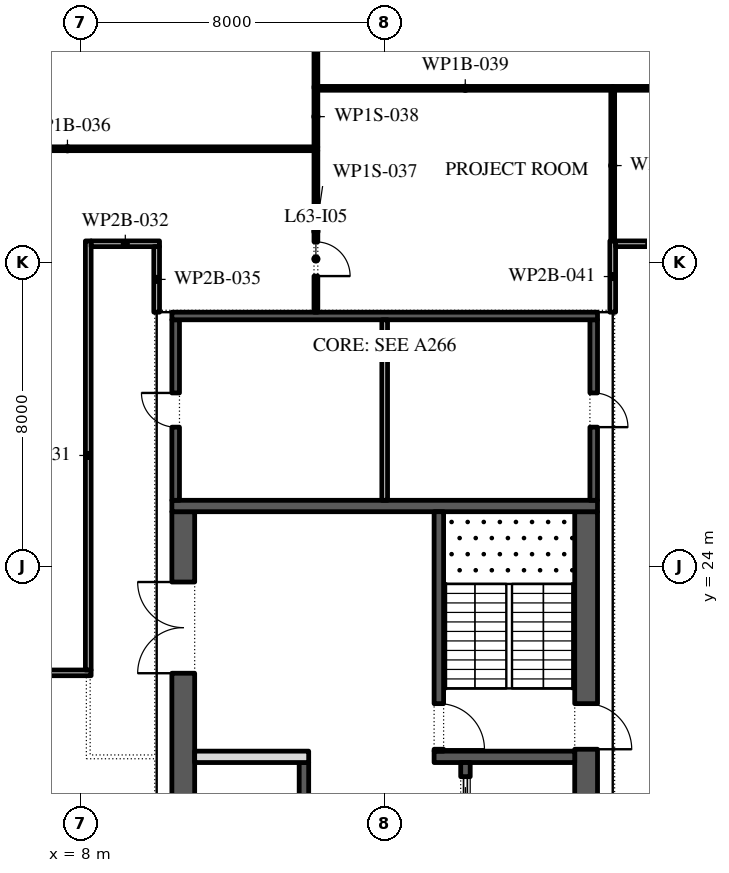
"""IFC4 building model, lengths in metres.
Left out: names, types, materials, properties, quantities, classifications, styles, units other than length and angle.
Written with IfcOpenShell. Run it as: python <this file> out.ifc"""

import sys

from ifc_helpers import new_model, si_unit, direction, frame, frame_2d, origin, place, context, subcontext, project, spatial, rectangle, extrude, element, fill, save


model = new_model("IFC4")
c1 = context("Model", 3, precision=1e-05, world=origin(), true_north=direction((0.0, 1.0)))
c2 = subcontext(c1, "Body", "Model", "MODEL_VIEW")
j1 = project(units=[si_unit("LENGTHUNIT", "METRE"), si_unit("PLANEANGLEUNIT", "RADIAN")], contexts=[c1])
p1 = place(None, origin())
s1 = spatial("IfcSite", under=j1, at=p1, CompositionType="ELEMENT")
p2 = place(p1, origin())
s2 = spatial("IfcBuilding", under=s1, at=p2, CompositionType="ELEMENT")
p3 = place(p2, frame((0.0, 0.0, 289.2)))
s3 = spatial("IfcBuildingStorey", under=s2, at=p3, CompositionType="ELEMENT", Elevation=289.2)
p4 = place(p3, frame((21.359, -11.678, 0.0), z_axis=(0.0, 0.0, 1.0), x_axis=(0.224949198343, 0.974370493275, 0.0)))
e1 = element("IfcWall", 1, at=p4, inside=s3, PredefinedType="STANDARD", context=c2, shape_type="SweptSolid", body=[
    extrude(rectangle(XDim=49.5, YDim=0.3, at=frame_2d((24.75, 0.0))), origin(), (0.0, 0.0, 1.0), 3.95),
])
p5 = place(p4, frame((1.157, 0.0, 0.45)))
e2 = element("IfcOpeningElement", 2, at=p5, cuts=e1, PredefinedType="OPENING", context=c2, shape_type="SweptSolid", body=[
    extrude(rectangle(XDim=4.5, YDim=3.05, at=frame_2d((2.25, 1.525))), frame((0.0, 0.16, 0.0), z_axis=(0.0, -1.0, 0.0), x_axis=(1.0, 0.0, 0.0)), (0.0, 0.0, 1.0), 0.32),
])
p6 = place(p4, frame((8.121, 0.0, 0.45)))
e3 = element("IfcOpeningElement", 3, at=p6, cuts=e1, PredefinedType="OPENING", context=c2, shape_type="SweptSolid", body=[
    extrude(rectangle(XDim=4.5, YDim=3.05, at=frame_2d((2.25, 1.525))), frame((0.0, 0.16, 0.0), z_axis=(0.0, -1.0, 0.0), x_axis=(1.0, 0.0, 0.0)), (0.0, 0.0, 1.0), 0.32),
])
p7 = place(p4, frame((15.236, 0.0, 0.45)))
e4 = element("IfcOpeningElement", 4, at=p7, cuts=e1, PredefinedType="OPENING", context=c2, shape_type="SweptSolid", body=[
    extrude(rectangle(XDim=4.5, YDim=3.05, at=frame_2d((2.25, 1.525))), frame((0.0, 0.16, 0.0), z_axis=(0.0, -1.0, 0.0), x_axis=(1.0, 0.0, 0.0)), (0.0, 0.0, 1.0), 0.32),
])
p8 = place(p4, frame((22.35, 0.0, 0.45)))
e5 = element("IfcOpeningElement", 5, at=p8, cuts=e1, PredefinedType="OPENING", context=c2, shape_type="SweptSolid", body=[
    extrude(rectangle(XDim=4.5, YDim=3.0, at=frame_2d((2.25, 1.5))), frame((0.0, 0.16, 0.0), z_axis=(0.0, -1.0, 0.0), x_axis=(1.0, 0.0, 0.0)), (0.0, 0.0, 1.0), 0.32),
])
p9 = place(p4, frame((29.464, 0.0, 0.45)))
e6 = element("IfcOpeningElement", 6, at=p9, cuts=e1, PredefinedType="OPENING", context=c2, shape_type="SweptSolid", body=[
    extrude(rectangle(XDim=4.5, YDim=2.9, at=frame_2d((2.25, 1.45))), frame((0.0, 0.16, 0.0), z_axis=(0.0, -1.0, 0.0), x_axis=(1.0, 0.0, 0.0)), (0.0, 0.0, 1.0), 0.32),
])
p10 = place(p4, frame((37.628, 0.0, 0.0)))
e7 = element("IfcOpeningElement", 7, at=p10, cuts=e1, PredefinedType="OPENING", context=c2, shape_type="SweptSolid", body=[
    extrude(rectangle(XDim=2.4, YDim=3.275, at=frame_2d((1.2, 1.637))), frame((0.0, 0.16, 0.0), z_axis=(0.0, -1.0, 0.0), x_axis=(1.0, 0.0, 0.0)), (0.0, 0.0, 1.0), 0.32),
])
p11 = place(p4, frame((43.693, 0.0, 0.45)))
e8 = element("IfcOpeningElement", 8, at=p11, cuts=e1, PredefinedType="OPENING", context=c2, shape_type="SweptSolid", body=[
    extrude(rectangle(XDim=4.5, YDim=3.05, at=frame_2d((2.25, 1.525))), frame((0.0, 0.16, 0.0), z_axis=(0.0, -1.0, 0.0), x_axis=(1.0, 0.0, 0.0)), (0.0, 0.0, 1.0), 0.32),
])
p12 = place(p3, frame((21.3, -2.45, 0.0), z_axis=(0.0, 0.0, 1.0), x_axis=(0.0, 1.0, 0.0)))
e9 = element("IfcWall", 9, at=p12, inside=s3, PredefinedType="SHEAR", context=c2, shape_type="SweptSolid", body=[
    extrude(rectangle(XDim=27.9, YDim=0.6, at=frame_2d((13.95, 0.0))), origin(), (0.0, 0.0, 1.0), 3.95),
])
p13 = place(p12, frame((5.05, 0.0, 0.0)))
e10 = element("IfcOpeningElement", 10, at=p13, cuts=e9, PredefinedType="OPENING", context=c2, shape_type="SweptSolid", body=[
    extrude(rectangle(XDim=1.2, YDim=2.1, at=frame_2d((0.6, 1.05))), frame((0.0, 0.31, 0.0), z_axis=(0.0, -1.0, 0.0), x_axis=(1.0, 0.0, 0.0)), (0.0, 0.0, 1.0), 0.62),
])
p14 = place(p12, frame((21.65, 0.0, 0.0)))
e11 = element("IfcOpeningElement", 11, at=p14, cuts=e9, PredefinedType="OPENING", context=c2, shape_type="SweptSolid", body=[
    extrude(rectangle(XDim=1.2, YDim=2.1, at=frame_2d((0.6, 1.05))), frame((0.0, 0.31, 0.0), z_axis=(0.0, -1.0, 0.0), x_axis=(1.0, 0.0, 0.0)), (0.0, 0.0, 1.0), 0.62),
])
p15 = place(p3, frame((10.7, -2.45, 0.0), z_axis=(0.0, 0.0, 1.0), x_axis=(0.0, 1.0, 0.0)))
e12 = element("IfcWall", 12, at=p15, inside=s3, PredefinedType="SHEAR", context=c2, shape_type="SweptSolid", body=[
    extrude(rectangle(XDim=27.9, YDim=0.6, at=frame_2d((13.95, 0.0))), origin(), (0.0, 0.0, 1.0), 3.95),
])
p16 = place(p15, frame((23.65, 0.0, 0.0)))
e13 = element("IfcOpeningElement", 13, at=p16, cuts=e12, PredefinedType="OPENING", context=c2, shape_type="SweptSolid", body=[
    extrude(rectangle(XDim=2.4, YDim=2.1, at=frame_2d((1.2, 1.05))), frame((0.0, 0.31, 0.0), z_axis=(0.0, -1.0, 0.0), x_axis=(1.0, 0.0, 0.0)), (0.0, 0.0, 1.0), 0.62),
])
p17 = place(p15, frame((1.387, 0.0, 0.0)))
e14 = element("IfcOpeningElement", 14, at=p17, cuts=e12, PredefinedType="OPENING", context=c2, shape_type="SweptSolid", body=[
    extrude(rectangle(XDim=0.9, YDim=2.1, at=frame_2d((0.45, 1.05))), frame((0.0, 0.31, 0.0), z_axis=(0.0, -1.0, 0.0), x_axis=(1.0, 0.0, 0.0)), (0.0, 0.0, 1.0), 0.62),
])
p18 = place(p15, frame((4.562, 0.0, 0.0)))
e15 = element("IfcOpeningElement", 15, at=p18, cuts=e12, PredefinedType="OPENING", context=c2, shape_type="SweptSolid", body=[
    extrude(rectangle(XDim=1.0, YDim=2.1, at=frame_2d((0.5, 1.05))), frame((0.0, 0.31, 0.0), z_axis=(0.0, -1.0, 0.0), x_axis=(1.0, 0.0, 0.0)), (0.0, 0.0, 1.0), 0.62),
])
p19 = place(p3, frame((10.4, 25.6, 0.0), z_axis=(0.0, 0.0, 1.0), x_axis=(1.0, 0.0, 0.0)))
e16 = element("IfcWall", 16, at=p19, inside=s3, PredefinedType="SHEAR", context=c2, shape_type="SweptSolid", body=[
    extrude(rectangle(XDim=11.2, YDim=0.3, at=frame_2d((5.6, 0.0))), origin(), (0.0, 0.0, 1.0), 3.95),
])
p20 = place(p3, frame((17.3, 19.0, 0.0), z_axis=(0.0, 0.0, 1.0), x_axis=(1.0, 0.0, 0.0)))
e17 = element("IfcWall", 17, at=p20, inside=s3, PredefinedType="SHEAR", context=c2, shape_type="SweptSolid", body=[
    extrude(rectangle(XDim=3.7, YDim=0.3, at=frame_2d((1.85, 0.0))), origin(), (0.0, 0.0, 1.0), 3.95),
])
p21 = place(p3, frame((17.425, 19.15, 0.0), z_axis=(0.0, 0.0, 1.0), x_axis=(0.0, 1.0, 0.0)))
e18 = element("IfcWall", 18, at=p21, inside=s3, PredefinedType="SHEAR", context=c2, shape_type="SweptSolid", body=[
    extrude(rectangle(XDim=6.3, YDim=0.25, at=frame_2d((3.15, 0.0))), origin(), (0.0, 0.0, 1.0), 3.95),
])
p22 = place(p21, frame((0.05, 0.0, 0.0)))
e19 = element("IfcOpeningElement", 19, at=p22, cuts=e18, PredefinedType="OPENING", context=c2, shape_type="SweptSolid", body=[
    extrude(rectangle(XDim=1.2, YDim=2.1, at=frame_2d((0.6, 1.05))), frame((0.0, 0.135, 0.0), z_axis=(0.0, -1.0, 0.0), x_axis=(1.0, 0.0, 0.0)), (0.0, 0.0, 1.0), 0.27),
])
p23 = place(p3, frame((18.125, 4.15, 0.0), z_axis=(0.0, 0.0, 1.0), x_axis=(0.0, 1.0, 0.0)))
e20 = element("IfcWall", 20, at=p23, inside=s3, PredefinedType="SHEAR", context=c2, shape_type="SweptSolid", body=[
    extrude(rectangle(XDim=14.7, YDim=0.25, at=frame_2d((7.35, 0.0))), origin(), (0.0, 0.0, 1.0), 3.95),
])
p24 = place(p23, frame((3.446, 0.0, 0.0)))
e21 = element("IfcOpeningElement", 21, at=p24, cuts=e20, PredefinedType="OPENING", context=c2, shape_type="SweptSolid", body=[
    extrude(rectangle(XDim=0.9, YDim=2.1, at=frame_2d((0.45, 1.05))), frame((0.0, 0.135, 0.0), z_axis=(0.0, -1.0, 0.0), x_axis=(1.0, 0.0, 0.0)), (0.0, 0.0, 1.0), 0.27),
])
p25 = place(p23, frame((6.9, 0.0, 0.0)))
e22 = element("IfcOpeningElement", 22, at=p25, cuts=e20, PredefinedType="OPENING", context=c2, shape_type="SweptSolid", body=[
    extrude(rectangle(XDim=0.9, YDim=2.1, at=frame_2d((0.45, 1.05))), frame((0.0, 0.135, 0.0), z_axis=(0.0, -1.0, 0.0), x_axis=(1.0, 0.0, 0.0)), (0.0, 0.0, 1.0), 0.27),
])
p26 = place(p23, frame((10.354, 0.0, 0.0)))
e23 = element("IfcOpeningElement", 23, at=p26, cuts=e20, PredefinedType="OPENING", context=c2, shape_type="SweptSolid", body=[
    extrude(rectangle(XDim=0.9, YDim=2.1, at=frame_2d((0.45, 1.05))), frame((0.0, 0.135, 0.0), z_axis=(0.0, -1.0, 0.0), x_axis=(1.0, 0.0, 0.0)), (0.0, 0.0, 1.0), 0.27),
])
p27 = place(p23, frame((0.371, 0.0, 0.0)))
e24 = element("IfcOpeningElement", 24, at=p27, cuts=e20, PredefinedType="OPENING", context=c2, shape_type="SweptSolid", body=[
    extrude(rectangle(XDim=1.1, YDim=2.1, at=frame_2d((0.55, 1.05))), frame((0.0, 0.135, 0.0), z_axis=(0.0, -1.0, 0.0), x_axis=(1.0, 0.0, 0.0)), (0.0, 0.0, 1.0), 0.27),
])
p28 = place(p23, frame((13.229, 0.0, 0.0)))
e25 = element("IfcOpeningElement", 25, at=p28, cuts=e20, PredefinedType="OPENING", context=c2, shape_type="SweptSolid", body=[
    extrude(rectangle(XDim=1.1, YDim=2.1, at=frame_2d((0.55, 1.05))), frame((0.0, 0.135, 0.0), z_axis=(0.0, -1.0, 0.0), x_axis=(1.0, 0.0, 0.0)), (0.0, 0.0, 1.0), 0.27),
])
p29 = place(p3, frame((13.875, -2.45, 0.0), z_axis=(0.0, 0.0, 1.0), x_axis=(0.0, 1.0, 0.0)))
e26 = element("IfcWall", 26, at=p29, inside=s3, PredefinedType="SHEAR", context=c2, shape_type="SweptSolid", body=[
    extrude(rectangle(XDim=21.3, YDim=0.25, at=frame_2d((10.65, 0.0))), origin(), (0.0, 0.0, 1.0), 3.95),
])
p30 = place(p29, frame((17.786, 0.0, 0.0)))
e27 = element("IfcOpeningElement", 27, at=p30, cuts=e26, PredefinedType="OPENING", context=c2, shape_type="SweptSolid", body=[
    extrude(rectangle(XDim=0.9, YDim=2.1, at=frame_2d((0.45, 1.05))), frame((0.0, 0.135, 0.0), z_axis=(0.0, -1.0, 0.0), x_axis=(1.0, 0.0, 0.0)), (0.0, 0.0, 1.0), 0.27),
])
p31 = place(p29, frame((6.971, 0.0, 0.0)))
e28 = element("IfcOpeningElement", 28, at=p31, cuts=e26, PredefinedType="OPENING", context=c2, shape_type="SweptSolid", body=[
    extrude(rectangle(XDim=1.1, YDim=2.1, at=frame_2d((0.55, 1.05))), frame((0.0, 0.135, 0.0), z_axis=(0.0, -1.0, 0.0), x_axis=(1.0, 0.0, 0.0)), (0.0, 0.0, 1.0), 0.27),
])
p32 = place(p29, frame((9.114, 0.0, 0.0)))
e29 = element("IfcOpeningElement", 29, at=p32, cuts=e26, PredefinedType="OPENING", context=c2, shape_type="SweptSolid", body=[
    extrude(rectangle(XDim=1.1, YDim=2.1, at=frame_2d((0.55, 1.05))), frame((0.0, 0.135, 0.0), z_axis=(0.0, -1.0, 0.0), x_axis=(1.0, 0.0, 0.0)), (0.0, 0.0, 1.0), 0.27),
])
p33 = place(p29, frame((11.257, 0.0, 0.0)))
e30 = element("IfcOpeningElement", 30, at=p33, cuts=e26, PredefinedType="OPENING", context=c2, shape_type="SweptSolid", body=[
    extrude(rectangle(XDim=1.1, YDim=2.1, at=frame_2d((0.55, 1.05))), frame((0.0, 0.135, 0.0), z_axis=(0.0, -1.0, 0.0), x_axis=(1.0, 0.0, 0.0)), (0.0, 0.0, 1.0), 0.27),
])
p34 = place(p29, frame((13.4, 0.0, 0.0)))
e31 = element("IfcOpeningElement", 31, at=p34, cuts=e26, PredefinedType="OPENING", context=c2, shape_type="SweptSolid", body=[
    extrude(rectangle(XDim=1.1, YDim=2.1, at=frame_2d((0.55, 1.05))), frame((0.0, 0.135, 0.0), z_axis=(0.0, -1.0, 0.0), x_axis=(1.0, 0.0, 0.0)), (0.0, 0.0, 1.0), 0.27),
])
p35 = place(p3, frame((11.0, 19.0, 0.0), z_axis=(0.0, 0.0, 1.0), x_axis=(1.0, 0.0, 0.0)))
e32 = element("IfcWall", 32, at=p35, inside=s3, PredefinedType="PARTITIONING", context=c2, shape_type="SweptSolid", body=[
    extrude(rectangle(XDim=3.0, YDim=0.3, at=frame_2d((1.5, 0.0))), origin(), (0.0, 0.0, 1.0), 3.95),
])
p36 = place(p3, frame((21.5, 25.75, 0.0), z_axis=(0.0, 0.0, 1.0), x_axis=(0.0, 1.0, 0.0)))
e33 = element("IfcWall", 33, at=p36, inside=s3, PredefinedType="SHEAR", context=c2, shape_type="SweptSolid", body=[
    extrude(rectangle(XDim=4.75, YDim=0.2, at=frame_2d((2.375, 0.0))), origin(), (0.0, 0.0, 1.0), 3.95),
])
p37 = place(p36, frame((1.925, 0.0, 0.0)))
e34 = element("IfcOpeningElement", 34, at=p37, cuts=e33, PredefinedType="OPENING", context=c2, shape_type="SweptSolid", body=[
    extrude(rectangle(XDim=0.9, YDim=2.1, at=frame_2d((0.45, 1.05))), frame((0.0, 0.11, 0.0), z_axis=(0.0, -1.0, 0.0), x_axis=(1.0, 0.0, 0.0)), (0.0, 0.0, 1.0), 0.22),
])
p38 = place(p3, frame((10.5, 25.75, 0.0), z_axis=(0.0, 0.0, 1.0), x_axis=(0.0, 1.0, 0.0)))
e35 = element("IfcWall", 35, at=p38, inside=s3, PredefinedType="SHEAR", context=c2, shape_type="SweptSolid", body=[
    extrude(rectangle(XDim=4.75, YDim=0.2, at=frame_2d((2.375, 0.0))), origin(), (0.0, 0.0, 1.0), 3.95),
])
p39 = place(p38, frame((1.925, 0.0, 0.0)))
e36 = element("IfcOpeningElement", 36, at=p39, cuts=e35, PredefinedType="OPENING", context=c2, shape_type="SweptSolid", body=[
    extrude(rectangle(XDim=0.9, YDim=2.1, at=frame_2d((0.45, 1.05))), frame((0.0, 0.11, 0.0), z_axis=(0.0, -1.0, 0.0), x_axis=(1.0, 0.0, 0.0)), (0.0, 0.0, 1.0), 0.22),
])
p40 = place(p3, frame((10.4, 30.6, 0.0), z_axis=(0.0, 0.0, 1.0), x_axis=(1.0, 0.0, 0.0)))
e37 = element("IfcWall", 37, at=p40, inside=s3, PredefinedType="SHEAR", context=c2, shape_type="SweptSolid", body=[
    extrude(rectangle(XDim=11.2, YDim=0.2, at=frame_2d((5.6, 0.0))), origin(), (0.0, 0.0, 1.0), 3.95),
])
p41 = place(p3, frame((16.0, 25.75, 0.0), z_axis=(0.0, 0.0, 1.0), x_axis=(0.0, 1.0, 0.0)))
e38 = element("IfcWall", 38, at=p41, inside=s3, PredefinedType="PARTITIONING", context=c2, shape_type="SweptSolid", body=[
    extrude(rectangle(XDim=4.75, YDim=0.15, at=frame_2d((2.375, 0.0))), origin(), (0.0, 0.0, 1.0), 3.95),
])
p42 = place(p3, frame((0.915, 21.21, 0.0), z_axis=(0.0, 0.0, 1.0), x_axis=(1.0, 0.0, 0.0)))
e39 = element("IfcWall", 39, at=p42, inside=s3, PredefinedType="PARTITIONING", context=c2, shape_type="SweptSolid", body=[
    extrude(rectangle(XDim=7.36, YDim=0.15, at=frame_2d((3.68, 0.0))), origin(), (0.0, 0.0, 1.0), 3.95),
])
p43 = place(p3, frame((8.2, 21.285, 0.0), z_axis=(0.0, 0.0, 1.0), x_axis=(0.0, 1.0, 0.0)))
e40 = element("IfcWall", 40, at=p43, inside=s3, PredefinedType="PARTITIONING", context=c2, shape_type="SweptSolid", body=[
    extrude(rectangle(XDim=11.29, YDim=0.15, at=frame_2d((5.645, 0.0))), origin(), (0.0, 0.0, 1.0), 3.95),
])
p44 = place(p3, frame((8.275, 32.5, 0.0), z_axis=(0.0, 0.0, 1.0), x_axis=(1.0, 0.0, 0.0)))
e41 = element("IfcWall", 41, at=p44, inside=s3, PredefinedType="PARTITIONING", context=c2, shape_type="SweptSolid", body=[
    extrude(rectangle(XDim=1.8, YDim=0.15, at=frame_2d((0.9, 0.0))), origin(), (0.0, 0.0, 1.0), 3.95),
])
p45 = place(p3, frame((10.0, 32.425, 0.0), z_axis=(0.0, 0.0, 1.0), x_axis=(0.0, -1.0, 0.0)))
e42 = element("IfcWall", 42, at=p45, inside=s3, PredefinedType="PARTITIONING", context=c2, shape_type="SweptSolid", body=[
    extrude(rectangle(XDim=1.725, YDim=0.15, at=frame_2d((0.863, 0.0))), origin(), (0.0, 0.0, 1.0), 3.95),
])
p46 = place(p3, frame((14.24, 35.0, 0.0), z_axis=(0.0, 0.0, 1.0), x_axis=(-1.0, 0.0, 0.0)))
e43 = element("IfcWall", 43, at=p46, inside=s3, PredefinedType="PARTITIONING", context=c2, shape_type="SweptSolid", body=[
    extrude(rectangle(XDim=13.175, YDim=0.1, at=frame_2d((6.587, 0.0))), origin(), (0.0, 0.0, 1.0), 3.95),
])
p47 = place(p3, frame((14.19, 34.95, 0.0), z_axis=(0.0, 0.0, 1.0), x_axis=(0.0, -1.0, 0.0)))
e44 = element("IfcWall", 44, at=p47, inside=s3, PredefinedType="PARTITIONING", context=c2, shape_type="SweptSolid", body=[
    extrude(rectangle(XDim=4.25, YDim=0.1, at=frame_2d((2.125, 0.0))), origin(), (0.0, 0.0, 1.0), 2.97),
])
p48 = place(p47, frame((2.4, 0.0, 0.0)))
e45 = element("IfcOpeningElement", 45, at=p48, cuts=e44, PredefinedType="OPENING", context=c2, shape_type="SweptSolid", body=[
    extrude(rectangle(XDim=0.9, YDim=2.1, at=frame_2d((0.45, 1.05))), frame((0.0, 0.06, 0.0), z_axis=(0.0, -1.0, 0.0), x_axis=(1.0, 0.0, 0.0)), (0.0, 0.0, 1.0), 0.12),
])
p49 = place(p3, frame((14.19, 36.64, 0.0), z_axis=(0.0, 0.0, 1.0), x_axis=(0.0, -1.0, 0.0)))
e46 = element("IfcWall", 46, at=p49, inside=s3, PredefinedType="PARTITIONING", context=c2, shape_type="SweptSolid", body=[
    extrude(rectangle(XDim=1.59, YDim=0.1, at=frame_2d((0.795, 0.0))), origin(), (0.0, 0.0, 1.0), 2.97),
])
p50 = place(p3, frame((14.24, 36.59, 0.0), z_axis=(0.0, 0.0, 1.0), x_axis=(1.0, 0.0, 0.0)))
e47 = element("IfcWall", 47, at=p50, inside=s3, PredefinedType="PARTITIONING", context=c2, shape_type="SweptSolid", body=[
    extrude(rectangle(XDim=7.76, YDim=0.1, at=frame_2d((3.88, 0.0))), origin(), (0.0, 0.0, 1.0), 3.95),
])
p51 = place(p3, frame((14.19, 44.248, 0.0), z_axis=(0.0, 0.0, 1.0), x_axis=(0.0, -1.0, 0.0)))
e48 = element("IfcWall", 48, at=p51, inside=s3, PredefinedType="PARTITIONING", context=c2, shape_type="SweptSolid", body=[
    extrude(rectangle(XDim=7.658, YDim=0.1, at=frame_2d((3.829, 0.0))), origin(), (0.0, 0.0, 1.0), 2.97),
])
p52 = place(p3, frame((22.0, 30.7, 0.0), z_axis=(0.0, 0.0, 1.0), x_axis=(0.0, 1.0, 0.0)))
e49 = element("IfcWall", 49, at=p52, inside=s3, PredefinedType="PARTITIONING", context=c2, shape_type="SweptSolid", body=[
    extrude(rectangle(XDim=1.875, YDim=0.15, at=frame_2d((0.938, 0.0))), origin(), (0.0, 0.0, 1.0), 3.95),
])
p53 = place(p3, frame((22.075, 32.5, 0.0), z_axis=(0.0, 0.0, 1.0), x_axis=(1.0, 0.0, 0.0)))
e50 = element("IfcWall", 50, at=p53, inside=s3, PredefinedType="PARTITIONING", context=c2, shape_type="SweptSolid", body=[
    extrude(rectangle(XDim=1.8, YDim=0.15, at=frame_2d((0.9, 0.0))), origin(), (0.0, 0.0, 1.0), 3.95),
])
p54 = place(p3, frame((22.0, 36.54, 0.0), z_axis=(0.0, 0.0, 1.0), x_axis=(0.0, -1.0, 0.0)))
e51 = element("IfcWall", 51, at=p54, inside=s3, PredefinedType="PARTITIONING", context=c2, shape_type="SweptSolid", body=[
    extrude(rectangle(XDim=3.965, YDim=0.1, at=frame_2d((1.982, 0.0))), origin(), (0.0, 0.0, 1.0), 3.95),
])
p55 = place(p3, frame((22.0, 36.59, 0.0), z_axis=(0.0, 0.0, 1.0), x_axis=(1.0, 0.0, 0.0)))
e52 = element("IfcWall", 52, at=p55, inside=s3, PredefinedType="PARTITIONING", context=c2, shape_type="SweptSolid", body=[
    extrude(rectangle(XDim=9.245, YDim=0.1, at=frame_2d((4.623, 0.0))), origin(), (0.0, 0.0, 1.0), 3.95),
])
p56 = place(p55, frame((3.75, 0.0, 0.0)))
e53 = element("IfcOpeningElement", 53, at=p56, cuts=e52, PredefinedType="OPENING", context=c2, shape_type="SweptSolid", body=[
    extrude(rectangle(XDim=0.9, YDim=2.1, at=frame_2d((0.45, 1.05))), frame((0.0, 0.06, 0.0), z_axis=(0.0, -1.0, 0.0), x_axis=(1.0, 0.0, 0.0)), (0.0, 0.0, 1.0), 0.12),
])
p57 = place(p28, origin())
e54 = element("IfcDoor", 54, at=p57, inside=s3, OperationType="SLIDING_TO_LEFT", PredefinedType="DOOR", context=c2, shape_type="SweptSolid", body=[
    extrude(rectangle(XDim=1.1, YDim=2.1, at=frame_2d((0.55, 1.05))), frame((0.0, 0.025, 0.0), z_axis=(0.0, -1.0, 0.0), x_axis=(1.0, 0.0, 0.0)), (0.0, 0.0, 1.0), 0.05),
])
fill(e25, e54)
p58 = place(p16, origin())
e55 = element("IfcDoor", 55, at=p58, inside=s3, OperationType="DOUBLE_DOOR_SINGLE_SWING", PredefinedType="DOOR", context=c2, shape_type="SweptSolid", body=[
    extrude(rectangle(XDim=2.4, YDim=2.1, at=frame_2d((1.2, 1.05))), frame((0.0, 0.025, 0.0), z_axis=(0.0, -1.0, 0.0), x_axis=(1.0, 0.0, 0.0)), (0.0, 0.0, 1.0), 0.05),
])
fill(e13, e55)
p59 = place(p22, frame((1.2, 0.0, 0.0), z_axis=(0.0, 0.0, 1.0), x_axis=(-1.0, 0.0, 0.0)))
e56 = element("IfcDoor", 56, at=p59, inside=s3, OperationType="SINGLE_SWING_LEFT", PredefinedType="DOOR", context=c2, shape_type="SweptSolid", body=[
    extrude(rectangle(XDim=1.2, YDim=2.1, at=frame_2d((0.6, 1.05))), frame((0.0, 0.025, 0.0), z_axis=(0.0, -1.0, 0.0), x_axis=(1.0, 0.0, 0.0)), (0.0, 0.0, 1.0), 0.05),
])
fill(e19, e56)
p60 = place(p14, frame((1.2, 0.0, 0.0), z_axis=(0.0, 0.0, 1.0), x_axis=(-1.0, 0.0, 0.0)))
e57 = element("IfcDoor", 57, at=p60, inside=s3, OperationType="SINGLE_SWING_LEFT", PredefinedType="DOOR", context=c2, shape_type="SweptSolid", body=[
    extrude(rectangle(XDim=1.2, YDim=2.1, at=frame_2d((0.6, 1.05))), frame((0.0, 0.025, 0.0), z_axis=(0.0, -1.0, 0.0), x_axis=(1.0, 0.0, 0.0)), (0.0, 0.0, 1.0), 0.05),
])
fill(e11, e57)
p61 = place(p37, frame((0.9, 0.15, 0.0), z_axis=(0.0, 0.0, 1.0), x_axis=(-1.0, 0.0, 0.0)))
e58 = element("IfcDoor", 58, at=p61, inside=s3, OperationType="SINGLE_SWING_LEFT", PredefinedType="DOOR", context=c2, shape_type="SweptSolid", body=[
    extrude(rectangle(XDim=0.9, YDim=2.1, at=frame_2d((0.45, 1.05))), frame((0.0, 0.1, 0.0), z_axis=(0.0, -1.0, 0.0), x_axis=(1.0, 0.0, 0.0)), (0.0, 0.0, 1.0), 0.05),
])
fill(e34, e58)
p62 = place(p39, origin())
e59 = element("IfcDoor", 59, at=p62, inside=s3, OperationType="SINGLE_SWING_LEFT", PredefinedType="DOOR", context=c2, shape_type="SweptSolid", body=[
    extrude(rectangle(XDim=0.9, YDim=2.1, at=frame_2d((0.45, 1.05))), frame((0.0, -0.05, 0.0), z_axis=(0.0, -1.0, 0.0), x_axis=(1.0, 0.0, 0.0)), (0.0, 0.0, 1.0), 0.05),
])
fill(e36, e59)
p63 = place(p48, origin())
e60 = element("IfcDoor", 60, at=p63, inside=s3, OperationType="SINGLE_SWING_LEFT", PredefinedType="DOOR", context=c2, shape_type="SweptSolid", body=[
    extrude(rectangle(XDim=0.9, YDim=2.1, at=frame_2d((0.45, 1.05))), frame((0.0, 0.025, 0.0), z_axis=(0.0, -1.0, 0.0), x_axis=(1.0, 0.0, 0.0)), (0.0, 0.0, 1.0), 0.05),
])
fill(e45, e60)
save(model, sys.argv[1])
